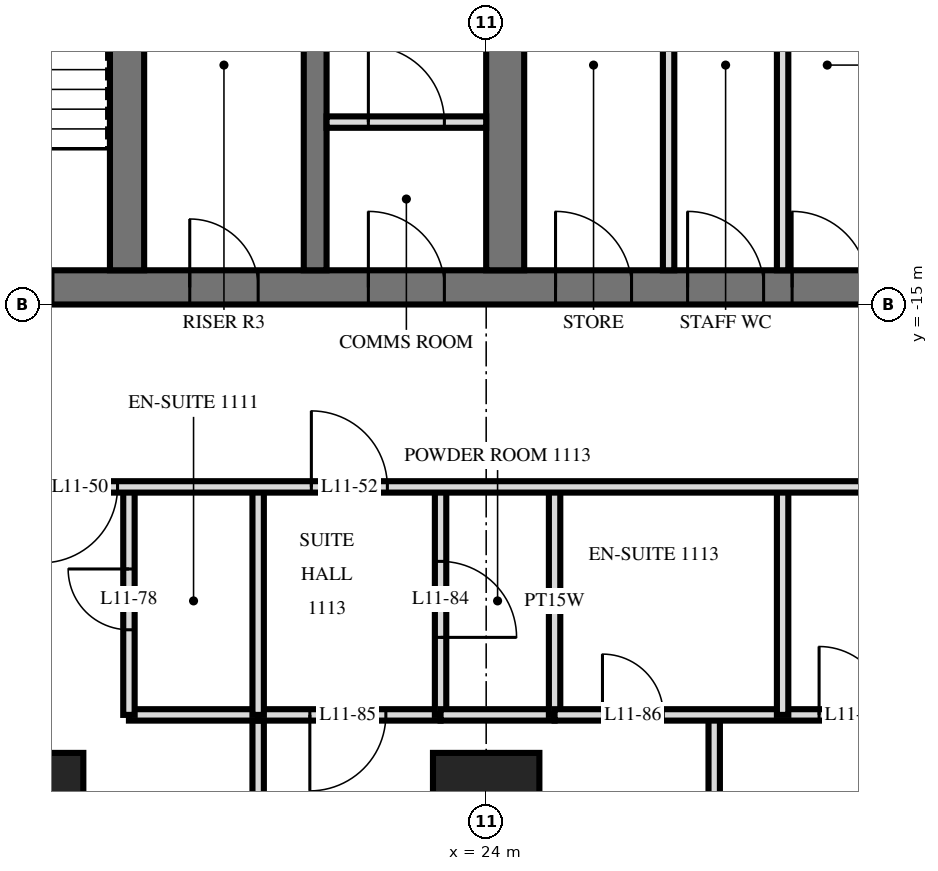
"""IFC4 building model, lengths in metres.
Left out: names, types, materials, properties, quantities, classifications, styles, units other than length and angle.
Written with IfcOpenShell. Run it as: python <this file> out.ifc"""

import sys

from ifc_helpers import new_model, si_unit, direction, frame, frame_2d, origin, origin_2d, place, context, subcontext, project, spatial, rectangle, extrude, element, fill, save


model = new_model("IFC4")
c1 = context("Model", 3, precision=1e-05, world=origin(), true_north=direction((0.0, 1.0)))
c2 = subcontext(c1, "Body", "Model", "MODEL_VIEW")
j1 = project(units=[si_unit("LENGTHUNIT", "METRE"), si_unit("PLANEANGLEUNIT", "RADIAN")], contexts=[c1])
p1 = place(None, origin())
s1 = spatial("IfcSite", under=j1, at=p1, CompositionType="ELEMENT")
p2 = place(p1, origin())
s2 = spatial("IfcBuilding", under=s1, at=p2, CompositionType="ELEMENT")
p3 = place(p2, frame((0.0, 0.0, 49.2)))
s3 = spatial("IfcBuildingStorey", under=s2, at=p3, CompositionType="ELEMENT", Elevation=49.2)
for number, where, z_axis, x_axis in (
    (1, (18.0, -21.6, 0.0), (0.0, 0.0, 1.0), (1.0, 0.0, 0.0)),
    (2, (24.0, -21.6, 0.0), (0.0, 0.0, 1.0), (1.0, 0.0, 0.0)),
):
    element("IfcColumn", number, at=place(p3, frame(where, z_axis=z_axis, x_axis=x_axis)), inside=s3, PredefinedType="COLUMN", context=c2, shape_type="SweptSolid", body=[
        extrude(rectangle(XDim=1.4, YDim=1.4, at=origin_2d()), origin(), (0.0, 0.0, 1.0), 3.6),
    ])
p4 = place(p3, frame((10.0, -14.775, 0.0), z_axis=(0.0, 0.0, 1.0), x_axis=(1.0, 0.0, 0.0)))
e3 = element("IfcWall", 3, at=p4, inside=s3, PredefinedType="SHEAR", context=c2, shape_type="SweptSolid", body=[
    extrude(rectangle(XDim=19.5, YDim=0.45, at=frame_2d((9.75, 0.0))), origin(), (0.0, 0.0, 1.0), 3.6),
])
p5 = place(p4, frame((7.1, 0.0, 0.0)))
e4 = element("IfcOpeningElement", 4, at=p5, cuts=e3, PredefinedType="OPENING", context=c2, shape_type="SweptSolid", body=[
    extrude(rectangle(XDim=1.2, YDim=2.1, at=frame_2d((0.6, 1.05))), frame((0.0, 0.235, 0.0), z_axis=(0.0, -1.0, 0.0), x_axis=(1.0, 0.0, 0.0)), (0.0, 0.0, 1.0), 0.47),
])
p6 = place(p4, frame((4.15, 0.0, 0.0)))
e5 = element("IfcOpeningElement", 5, at=p6, cuts=e3, PredefinedType="OPENING", context=c2, shape_type="SweptSolid", body=[
    extrude(rectangle(XDim=1.1, YDim=2.1, at=frame_2d((0.55, 1.05))), frame((0.0, 0.235, 0.0), z_axis=(0.0, -1.0, 0.0), x_axis=(1.0, 0.0, 0.0)), (0.0, 0.0, 1.0), 0.47),
])
p7 = place(p4, frame((10.1, 0.0, 0.0)))
e6 = element("IfcOpeningElement", 6, at=p7, cuts=e3, PredefinedType="OPENING", context=c2, shape_type="SweptSolid", body=[
    extrude(rectangle(XDim=0.9, YDim=2.1, at=frame_2d((0.45, 1.05))), frame((0.0, 0.235, 0.0), z_axis=(0.0, -1.0, 0.0), x_axis=(1.0, 0.0, 0.0)), (0.0, 0.0, 1.0), 0.47),
])
p8 = place(p4, frame((12.45, 0.0, 0.0)))
e7 = element("IfcOpeningElement", 7, at=p8, cuts=e3, PredefinedType="OPENING", context=c2, shape_type="SweptSolid", body=[
    extrude(rectangle(XDim=1.0, YDim=2.1, at=frame_2d((0.5, 1.05))), frame((0.0, 0.235, 0.0), z_axis=(0.0, -1.0, 0.0), x_axis=(1.0, 0.0, 0.0)), (0.0, 0.0, 1.0), 0.47),
])
p9 = place(p4, frame((14.913, 0.0, 0.0)))
e8 = element("IfcOpeningElement", 8, at=p9, cuts=e3, PredefinedType="OPENING", context=c2, shape_type="SweptSolid", body=[
    extrude(rectangle(XDim=1.0, YDim=2.1, at=frame_2d((0.5, 1.05))), frame((0.0, 0.235, 0.0), z_axis=(0.0, -1.0, 0.0), x_axis=(1.0, 0.0, 0.0)), (0.0, 0.0, 1.0), 0.47),
])
p10 = place(p4, frame((16.65, 0.0, 0.0)))
e9 = element("IfcOpeningElement", 9, at=p10, cuts=e3, PredefinedType="OPENING", context=c2, shape_type="SweptSolid", body=[
    extrude(rectangle(XDim=1.0, YDim=2.1, at=frame_2d((0.5, 1.05))), frame((0.0, 0.235, 0.0), z_axis=(0.0, -1.0, 0.0), x_axis=(1.0, 0.0, 0.0)), (0.0, 0.0, 1.0), 0.47),
])
p11 = place(p4, frame((18.025, 0.0, 0.0)))
e10 = element("IfcOpeningElement", 10, at=p11, cuts=e3, PredefinedType="OPENING", context=c2, shape_type="SweptSolid", body=[
    extrude(rectangle(XDim=1.0, YDim=2.1, at=frame_2d((0.5, 1.05))), frame((0.0, 0.235, 0.0), z_axis=(0.0, -1.0, 0.0), x_axis=(1.0, 0.0, 0.0)), (0.0, 0.0, 1.0), 0.47),
])
p12 = place(p3, frame((19.275, -14.55, 0.0), z_axis=(0.0, 0.0, 1.0), x_axis=(0.0, 1.0, 0.0)))
e11 = element("IfcWall", 11, at=p12, inside=s3, PredefinedType="SHEAR", context=c2, shape_type="SweptSolid", body=[
    extrude(rectangle(XDim=5.4, YDim=0.45, at=frame_2d((2.7, 0.0))), origin(), (0.0, 0.0, 1.0), 3.6),
])
p13 = place(p3, frame((21.75, -14.55, 0.0), z_axis=(0.0, 0.0, 1.0), x_axis=(0.0, 1.0, 0.0)))
e12 = element("IfcWall", 12, at=p13, inside=s3, PredefinedType="SHEAR", context=c2, shape_type="SweptSolid", body=[
    extrude(rectangle(XDim=5.4, YDim=0.3, at=frame_2d((2.7, 0.0))), origin(), (0.0, 0.0, 1.0), 3.6),
])
p14 = place(p3, frame((24.25, -14.55, 0.0), z_axis=(0.0, 0.0, 1.0), x_axis=(0.0, 1.0, 0.0)))
e13 = element("IfcWall", 13, at=p14, inside=s3, PredefinedType="SHEAR", context=c2, shape_type="SweptSolid", body=[
    extrude(rectangle(XDim=5.4, YDim=0.5, at=frame_2d((2.7, 0.0))), origin(), (0.0, 0.0, 1.0), 3.6),
])
p15 = place(p3, frame((21.9, -12.6, 0.0), z_axis=(0.0, 0.0, 1.0), x_axis=(1.0, 0.0, 0.0)))
e14 = element("IfcWall", 14, at=p15, inside=s3, PredefinedType="PARTITIONING", context=c2, shape_type="SweptSolid", body=[
    extrude(rectangle(XDim=2.1, YDim=0.15, at=frame_2d((1.05, 0.0))), origin(), (0.0, 0.0, 1.0), 3.3),
])
p16 = place(p15, frame((0.55, 0.0, 0.0)))
e15 = element("IfcOpeningElement", 15, at=p16, cuts=e14, PredefinedType="OPENING", context=c2, shape_type="SweptSolid", body=[
    extrude(rectangle(XDim=1.0, YDim=2.1, at=frame_2d((0.5, 1.05))), frame((0.0, 0.085, 0.0), z_axis=(0.0, -1.0, 0.0), x_axis=(1.0, 0.0, 0.0)), (0.0, 0.0, 1.0), 0.17),
])
for number, where, z_axis, x_axis in (
    (16, (26.4, -14.55, 0.0), (0.0, 0.0, 1.0), (0.0, 1.0, 0.0)),
    (17, (27.9, -14.55, 0.0), (0.0, 0.0, 1.0), (0.0, 1.0, 0.0)),
):
    element("IfcWall", number, at=place(p3, frame(where, z_axis=z_axis, x_axis=x_axis)), inside=s3, PredefinedType="PARTITIONING", context=c2, shape_type="SweptSolid", body=[
        extrude(rectangle(XDim=5.4, YDim=0.15, at=frame_2d((2.7, 0.0))), origin(), (0.0, 0.0, 1.0), 3.3),
    ])
p17 = place(p3, frame((27.9, -20.4, 0.0), z_axis=(0.0, 0.0, 1.0), x_axis=(0.0, 1.0, 0.0)))
e18 = element("IfcWall", 18, at=p17, inside=s3, PredefinedType="PARTITIONING", context=c2, shape_type="SweptSolid", body=[
    extrude(rectangle(XDim=3.0, YDim=0.15, at=frame_2d((1.5, 0.0))), origin(), (0.0, 0.0, 1.0), 3.32),
])
p18 = place(p3, frame((27.0, -29.22, 0.0), z_axis=(0.0, 0.0, 1.0), x_axis=(0.0, 1.0, 0.0)))
e19 = element("IfcWall", 19, at=p18, inside=s3, PredefinedType="PARTITIONING", context=c2, shape_type="SweptSolid", body=[
    extrude(rectangle(XDim=8.82, YDim=0.15, at=frame_2d((4.41, 0.0))), origin(), (0.0, 0.0, 1.0), 3.32),
])
p19 = place(p18, frame((3.87, 0.0, 0.0)))
e20 = element("IfcOpeningElement", 20, at=p19, cuts=e19, PredefinedType="OPENING", context=c2, shape_type="SweptSolid", body=[
    extrude(rectangle(XDim=0.9, YDim=2.1, at=frame_2d((0.45, 1.05))), frame((0.0, 0.085, 0.0), z_axis=(0.0, -1.0, 0.0), x_axis=(1.0, 0.0, 0.0)), (0.0, 0.0, 1.0), 0.17),
])
p20 = place(p3, frame((24.9, -20.4, 0.0), z_axis=(0.0, 0.0, 1.0), x_axis=(0.0, 1.0, 0.0)))
e21 = element("IfcWall", 21, at=p20, inside=s3, PredefinedType="PLUMBINGWALL", context=c2, shape_type="SweptSolid", body=[
    extrude(rectangle(XDim=3.0, YDim=0.15, at=frame_2d((1.5, 0.0))), origin(), (0.0, 0.0, 1.0), 3.32),
])
p21 = place(p3, frame((23.4, -20.4, 0.0), z_axis=(0.0, 0.0, 1.0), x_axis=(0.0, 1.0, 0.0)))
e22 = element("IfcWall", 22, at=p21, inside=s3, PredefinedType="PARTITIONING", context=c2, shape_type="SweptSolid", body=[
    extrude(rectangle(XDim=3.0, YDim=0.15, at=frame_2d((1.5, 0.0))), origin(), (0.0, 0.0, 1.0), 3.32),
])
p22 = place(p21, frame((1.02, 0.0, 0.0)))
e23 = element("IfcOpeningElement", 23, at=p22, cuts=e22, PredefinedType="OPENING", context=c2, shape_type="SweptSolid", body=[
    extrude(rectangle(XDim=1.0, YDim=2.1, at=frame_2d((0.5, 1.05))), frame((0.0, 0.085, 0.0), z_axis=(0.0, -1.0, 0.0), x_axis=(1.0, 0.0, 0.0)), (0.0, 0.0, 1.0), 0.17),
])
p23 = place(p3, frame((21.0, -20.4, 0.0), z_axis=(0.0, 0.0, 1.0), x_axis=(0.0, 1.0, 0.0)))
e24 = element("IfcWall", 24, at=p23, inside=s3, PredefinedType="PARTITIONING", context=c2, shape_type="SweptSolid", body=[
    extrude(rectangle(XDim=3.0, YDim=0.15, at=frame_2d((1.5, 0.0))), origin(), (0.0, 0.0, 1.0), 3.32),
])
p24 = place(p3, frame((21.0, -29.22, 0.0), z_axis=(0.0, 0.0, 1.0), x_axis=(0.0, 1.0, 0.0)))
e25 = element("IfcWall", 25, at=p24, inside=s3, PredefinedType="PARTITIONING", context=c2, shape_type="SweptSolid", body=[
    extrude(rectangle(XDim=8.82, YDim=0.15, at=frame_2d((4.41, 0.0))), origin(), (0.0, 0.0, 1.0), 3.32),
])
p25 = place(p3, frame((19.3, -20.4, 0.0), z_axis=(0.0, 0.0, 1.0), x_axis=(0.0, 1.0, 0.0)))
e26 = element("IfcWall", 26, at=p25, inside=s3, PredefinedType="PARTITIONING", context=c2, shape_type="SweptSolid", body=[
    extrude(rectangle(XDim=3.0, YDim=0.15, at=frame_2d((1.5, 0.0))), origin(), (0.0, 0.0, 1.0), 3.32),
])
p26 = place(p25, frame((1.12, 0.0, 0.0)))
e27 = element("IfcOpeningElement", 27, at=p26, cuts=e26, PredefinedType="OPENING", context=c2, shape_type="SweptSolid", body=[
    extrude(rectangle(XDim=0.8, YDim=2.1, at=frame_2d((0.4, 1.05))), frame((0.0, 0.085, 0.0), z_axis=(0.0, -1.0, 0.0), x_axis=(1.0, 0.0, 0.0)), (0.0, 0.0, 1.0), 0.17),
])
p27 = place(p3, frame((21.0, -20.4, 0.0), z_axis=(0.0, 0.0, 1.0), x_axis=(1.0, 0.0, 0.0)))
e28 = element("IfcWall", 28, at=p27, inside=s3, PredefinedType="PARTITIONING", context=c2, shape_type="SweptSolid", body=[
    extrude(rectangle(XDim=2.4, YDim=0.15, at=frame_2d((1.2, 0.0))), origin(), (0.0, 0.0, 1.0), 3.32),
])
p28 = place(p27, frame((0.68, 0.0, 0.0)))
e29 = element("IfcOpeningElement", 29, at=p28, cuts=e28, PredefinedType="OPENING", context=c2, shape_type="SweptSolid", body=[
    extrude(rectangle(XDim=1.0, YDim=2.1, at=frame_2d((0.5, 1.05))), frame((0.0, 0.085, 0.0), z_axis=(0.0, -1.0, 0.0), x_axis=(1.0, 0.0, 0.0)), (0.0, 0.0, 1.0), 0.17),
])
p29 = place(p3, frame((19.3, -20.4, 0.0), z_axis=(0.0, 0.0, 1.0), x_axis=(1.0, 0.0, 0.0)))
e30 = element("IfcWall", 30, at=p29, inside=s3, PredefinedType="PARTITIONING", context=c2, shape_type="SweptSolid", body=[
    extrude(rectangle(XDim=1.7, YDim=0.15, at=frame_2d((0.85, 0.0))), origin(), (0.0, 0.0, 1.0), 3.32),
])
p30 = place(p3, frame((24.9, -20.4, 0.0), z_axis=(0.0, 0.0, 1.0), x_axis=(1.0, 0.0, 0.0)))
e31 = element("IfcWall", 31, at=p30, inside=s3, PredefinedType="PARTITIONING", context=c2, shape_type="SweptSolid", body=[
    extrude(rectangle(XDim=8.22, YDim=0.15, at=frame_2d((4.11, 0.0))), origin(), (0.0, 0.0, 1.0), 3.32),
])
p31 = place(p30, frame((0.63, 0.0, 0.0)))
e32 = element("IfcOpeningElement", 32, at=p31, cuts=e31, PredefinedType="OPENING", context=c2, shape_type="SweptSolid", body=[
    extrude(rectangle(XDim=0.8, YDim=2.1, at=frame_2d((0.4, 1.05))), frame((0.0, 0.085, 0.0), z_axis=(0.0, -1.0, 0.0), x_axis=(1.0, 0.0, 0.0)), (0.0, 0.0, 1.0), 0.17),
])
p32 = place(p30, frame((3.48, 0.0, 0.0)))
e33 = element("IfcOpeningElement", 33, at=p32, cuts=e31, PredefinedType="OPENING", context=c2, shape_type="SweptSolid", body=[
    extrude(rectangle(XDim=0.9, YDim=2.1, at=frame_2d((0.45, 1.05))), frame((0.0, 0.085, 0.0), z_axis=(0.0, -1.0, 0.0), x_axis=(1.0, 0.0, 0.0)), (0.0, 0.0, 1.0), 0.17),
])
p33 = place(p3, frame((23.4, -20.4, 0.0), z_axis=(0.0, 0.0, 1.0), x_axis=(1.0, 0.0, 0.0)))
e34 = element("IfcWall", 34, at=p33, inside=s3, PredefinedType="PLUMBINGWALL", context=c2, shape_type="SweptSolid", body=[
    extrude(rectangle(XDim=1.5, YDim=0.15, at=frame_2d((0.75, 0.0))), origin(), (0.0, 0.0, 1.0), 3.32),
])
p34 = place(p3, frame((-33.12, -17.4, 0.0), z_axis=(0.0, 0.0, 1.0), x_axis=(1.0, 0.0, 0.0)))
e35 = element("IfcWall", 35, at=p34, inside=s3, PredefinedType="PARTITIONING", context=c2, shape_type="SweptSolid", body=[
    extrude(rectangle(XDim=66.24, YDim=0.15, at=frame_2d((33.12, 0.0))), origin(), (0.0, 0.0, 1.0), 3.32),
])
p35 = place(p34, frame((9.27, 0.0, 0.0)))
e36 = element("IfcOpeningElement", 36, at=p35, cuts=e35, PredefinedType="OPENING", context=c2, shape_type="SweptSolid", body=[
    extrude(rectangle(XDim=1.0, YDim=2.1, at=frame_2d((0.5, 1.05))), frame((0.0, 0.085, 0.0), z_axis=(0.0, -1.0, 0.0), x_axis=(1.0, 0.0, 0.0)), (0.0, 0.0, 1.0), 0.17),
])
p36 = place(p34, frame((13.97, 0.0, 0.0)))
e37 = element("IfcOpeningElement", 37, at=p36, cuts=e35, PredefinedType="OPENING", context=c2, shape_type="SweptSolid", body=[
    extrude(rectangle(XDim=1.0, YDim=2.1, at=frame_2d((0.5, 1.05))), frame((0.0, 0.085, 0.0), z_axis=(0.0, -1.0, 0.0), x_axis=(1.0, 0.0, 0.0)), (0.0, 0.0, 1.0), 0.17),
])
p37 = place(p34, frame((15.27, 0.0, 0.0)))
e38 = element("IfcOpeningElement", 38, at=p37, cuts=e35, PredefinedType="OPENING", context=c2, shape_type="SweptSolid", body=[
    extrude(rectangle(XDim=1.0, YDim=2.1, at=frame_2d((0.5, 1.05))), frame((0.0, 0.085, 0.0), z_axis=(0.0, -1.0, 0.0), x_axis=(1.0, 0.0, 0.0)), (0.0, 0.0, 1.0), 0.17),
])
p38 = place(p34, frame((19.97, 0.0, 0.0)))
e39 = element("IfcOpeningElement", 39, at=p38, cuts=e35, PredefinedType="OPENING", context=c2, shape_type="SweptSolid", body=[
    extrude(rectangle(XDim=1.0, YDim=2.1, at=frame_2d((0.5, 1.05))), frame((0.0, 0.085, 0.0), z_axis=(0.0, -1.0, 0.0), x_axis=(1.0, 0.0, 0.0)), (0.0, 0.0, 1.0), 0.17),
])
p39 = place(p34, frame((22.27, 0.0, 0.0)))
e40 = element("IfcOpeningElement", 40, at=p39, cuts=e35, PredefinedType="OPENING", context=c2, shape_type="SweptSolid", body=[
    extrude(rectangle(XDim=1.0, YDim=2.1, at=frame_2d((0.5, 1.05))), frame((0.0, 0.085, 0.0), z_axis=(0.0, -1.0, 0.0), x_axis=(1.0, 0.0, 0.0)), (0.0, 0.0, 1.0), 0.17),
])
p40 = place(p34, frame((28.97, 0.0, 0.0)))
e41 = element("IfcOpeningElement", 41, at=p40, cuts=e35, PredefinedType="OPENING", context=c2, shape_type="SweptSolid", body=[
    extrude(rectangle(XDim=1.0, YDim=2.1, at=frame_2d((0.5, 1.05))), frame((0.0, 0.085, 0.0), z_axis=(0.0, -1.0, 0.0), x_axis=(1.0, 0.0, 0.0)), (0.0, 0.0, 1.0), 0.17),
])
p41 = place(p34, frame((30.27, 0.0, 0.0)))
e42 = element("IfcOpeningElement", 42, at=p41, cuts=e35, PredefinedType="OPENING", context=c2, shape_type="SweptSolid", body=[
    extrude(rectangle(XDim=1.0, YDim=2.1, at=frame_2d((0.5, 1.05))), frame((0.0, 0.085, 0.0), z_axis=(0.0, -1.0, 0.0), x_axis=(1.0, 0.0, 0.0)), (0.0, 0.0, 1.0), 0.17),
])
p42 = place(p34, frame((34.97, 0.0, 0.0)))
e43 = element("IfcOpeningElement", 43, at=p42, cuts=e35, PredefinedType="OPENING", context=c2, shape_type="SweptSolid", body=[
    extrude(rectangle(XDim=1.0, YDim=2.1, at=frame_2d((0.5, 1.05))), frame((0.0, 0.085, 0.0), z_axis=(0.0, -1.0, 0.0), x_axis=(1.0, 0.0, 0.0)), (0.0, 0.0, 1.0), 0.17),
])
p43 = place(p34, frame((36.27, 0.0, 0.0)))
e44 = element("IfcOpeningElement", 44, at=p43, cuts=e35, PredefinedType="OPENING", context=c2, shape_type="SweptSolid", body=[
    extrude(rectangle(XDim=1.0, YDim=2.1, at=frame_2d((0.5, 1.05))), frame((0.0, 0.085, 0.0), z_axis=(0.0, -1.0, 0.0), x_axis=(1.0, 0.0, 0.0)), (0.0, 0.0, 1.0), 0.17),
])
p44 = place(p34, frame((39.82, 0.0, 0.0)))
e45 = element("IfcOpeningElement", 45, at=p44, cuts=e35, PredefinedType="OPENING", context=c2, shape_type="SweptSolid", body=[
    extrude(rectangle(XDim=1.0, YDim=2.1, at=frame_2d((0.5, 1.05))), frame((0.0, 0.085, 0.0), z_axis=(0.0, -1.0, 0.0), x_axis=(1.0, 0.0, 0.0)), (0.0, 0.0, 1.0), 0.17),
])
p45 = place(p34, frame((51.27, 0.0, 0.0)))
e46 = element("IfcOpeningElement", 46, at=p45, cuts=e35, PredefinedType="OPENING", context=c2, shape_type="SweptSolid", body=[
    extrude(rectangle(XDim=1.0, YDim=2.1, at=frame_2d((0.5, 1.05))), frame((0.0, 0.085, 0.0), z_axis=(0.0, -1.0, 0.0), x_axis=(1.0, 0.0, 0.0)), (0.0, 0.0, 1.0), 0.17),
])
p46 = place(p34, frame((4.42, 0.0, 0.0)))
e47 = element("IfcOpeningElement", 47, at=p46, cuts=e35, PredefinedType="OPENING", context=c2, shape_type="SweptSolid", body=[
    extrude(rectangle(XDim=1.0, YDim=2.1, at=frame_2d((0.5, 1.05))), frame((0.0, 0.085, 0.0), z_axis=(0.0, -1.0, 0.0), x_axis=(1.0, 0.0, 0.0)), (0.0, 0.0, 1.0), 0.17),
])
p47 = place(p34, frame((54.82, 0.0, 0.0)))
e48 = element("IfcOpeningElement", 48, at=p47, cuts=e35, PredefinedType="OPENING", context=c2, shape_type="SweptSolid", body=[
    extrude(rectangle(XDim=1.0, YDim=2.1, at=frame_2d((0.5, 1.05))), frame((0.0, 0.085, 0.0), z_axis=(0.0, -1.0, 0.0), x_axis=(1.0, 0.0, 0.0)), (0.0, 0.0, 1.0), 0.17),
])
p48 = place(p5, origin())
e49 = element("IfcDoor", 49, at=p48, inside=s3, OperationType="SINGLE_SWING_RIGHT", PredefinedType="DOOR", context=c2, shape_type="SweptSolid", body=[
    extrude(rectangle(XDim=1.2, YDim=2.1, at=frame_2d((0.6, 1.05))), frame((0.0, 0.025, 0.0), z_axis=(0.0, -1.0, 0.0), x_axis=(1.0, 0.0, 0.0)), (0.0, 0.0, 1.0), 0.05),
])
fill(e4, e49)
p49 = place(p7, origin())
e50 = element("IfcDoor", 50, at=p49, inside=s3, OperationType="SINGLE_SWING_RIGHT", PredefinedType="DOOR", context=c2, shape_type="SweptSolid", body=[
    extrude(rectangle(XDim=0.9, YDim=2.1, at=frame_2d((0.45, 1.05))), frame((0.0, 0.025, 0.0), z_axis=(0.0, -1.0, 0.0), x_axis=(1.0, 0.0, 0.0)), (0.0, 0.0, 1.0), 0.05),
])
fill(e6, e50)
p50 = place(p8, origin())
e51 = element("IfcDoor", 51, at=p50, inside=s3, OperationType="SINGLE_SWING_RIGHT", PredefinedType="DOOR", context=c2, shape_type="SweptSolid", body=[
    extrude(rectangle(XDim=1.0, YDim=2.1, at=frame_2d((0.5, 1.05))), frame((0.0, 0.025, 0.0), z_axis=(0.0, -1.0, 0.0), x_axis=(1.0, 0.0, 0.0)), (0.0, 0.0, 1.0), 0.05),
])
fill(e7, e51)
p51 = place(p9, origin())
e52 = element("IfcDoor", 52, at=p51, inside=s3, OperationType="SINGLE_SWING_RIGHT", PredefinedType="DOOR", context=c2, shape_type="SweptSolid", body=[
    extrude(rectangle(XDim=1.0, YDim=2.1, at=frame_2d((0.5, 1.05))), frame((0.0, 0.025, 0.0), z_axis=(0.0, -1.0, 0.0), x_axis=(1.0, 0.0, 0.0)), (0.0, 0.0, 1.0), 0.05),
])
fill(e8, e52)
p52 = place(p10, origin())
e53 = element("IfcDoor", 53, at=p52, inside=s3, OperationType="SINGLE_SWING_RIGHT", PredefinedType="DOOR", context=c2, shape_type="SweptSolid", body=[
    extrude(rectangle(XDim=1.0, YDim=2.1, at=frame_2d((0.5, 1.05))), frame((0.0, 0.025, 0.0), z_axis=(0.0, -1.0, 0.0), x_axis=(1.0, 0.0, 0.0)), (0.0, 0.0, 1.0), 0.05),
])
fill(e9, e53)
p53 = place(p11, origin())
e54 = element("IfcDoor", 54, at=p53, inside=s3, OperationType="SINGLE_SWING_RIGHT", PredefinedType="DOOR", context=c2, shape_type="SweptSolid", body=[
    extrude(rectangle(XDim=1.0, YDim=2.1, at=frame_2d((0.5, 1.05))), frame((0.0, 0.025, 0.0), z_axis=(0.0, -1.0, 0.0), x_axis=(1.0, 0.0, 0.0)), (0.0, 0.0, 1.0), 0.05),
])
fill(e10, e54)
p54 = place(p16, origin())
e55 = element("IfcDoor", 55, at=p54, inside=s3, OperationType="SINGLE_SWING_RIGHT", PredefinedType="DOOR", context=c2, shape_type="SweptSolid", body=[
    extrude(rectangle(XDim=1.0, YDim=2.1, at=frame_2d((0.5, 1.05))), frame((0.0, 0.025, 0.0), z_axis=(0.0, -1.0, 0.0), x_axis=(1.0, 0.0, 0.0)), (0.0, 0.0, 1.0), 0.05),
])
fill(e15, e55)
p55 = place(p45, frame((0.5, 0.0, 0.0), z_axis=(0.0, 0.0, 1.0), x_axis=(-1.0, 0.0, 0.0)))
e56 = element("IfcDoor", 56, at=p55, inside=s3, OperationType="SINGLE_SWING_LEFT", PredefinedType="DOOR", context=c2, shape_type="SweptSolid", body=[
    extrude(rectangle(XDim=1.0, YDim=2.1, at=frame_2d((0.0, 1.05))), frame((0.0, -0.025, 0.0), z_axis=(0.0, 1.0, 0.0), x_axis=(-1.0, 0.0, 0.0)), (0.0, 0.0, 1.0), 0.05),
])
fill(e46, e56)
p56 = place(p47, origin())
e57 = element("IfcDoor", 57, at=p56, inside=s3, OperationType="SINGLE_SWING_RIGHT", PredefinedType="DOOR", context=c2, shape_type="SweptSolid", body=[
    extrude(rectangle(XDim=1.0, YDim=2.1, at=frame_2d((0.5, 1.05))), frame((0.0, 0.025, 0.0), z_axis=(0.0, -1.0, 0.0), x_axis=(1.0, 0.0, 0.0)), (0.0, 0.0, 1.0), 0.05),
])
fill(e48, e57)
p57 = place(p26, origin())
e58 = element("IfcDoor", 58, at=p57, inside=s3, OperationType="SINGLE_SWING_LEFT", PredefinedType="DOOR", context=c2, shape_type="SweptSolid", body=[
    extrude(rectangle(XDim=0.8, YDim=2.1, at=frame_2d((0.4, 1.05))), frame((0.0, 0.025, 0.0), z_axis=(0.0, -1.0, 0.0), x_axis=(1.0, 0.0, 0.0)), (0.0, 0.0, 1.0), 0.05),
])
fill(e27, e58)
p58 = place(p22, frame((0.5, 0.0, 0.0), z_axis=(0.0, 0.0, 1.0), x_axis=(-1.0, 0.0, 0.0)))
e59 = element("IfcDoor", 59, at=p58, inside=s3, OperationType="SINGLE_SWING_LEFT", PredefinedType="DOOR", context=c2, shape_type="SweptSolid", body=[
    extrude(rectangle(XDim=1.0, YDim=2.1, at=frame_2d((0.0, 1.05))), frame((0.0, -0.025, 0.0), z_axis=(0.0, 1.0, 0.0), x_axis=(-1.0, 0.0, 0.0)), (0.0, 0.0, 1.0), 0.05),
])
fill(e23, e59)
p59 = place(p28, frame((0.5, 0.0, 0.0), z_axis=(0.0, 0.0, 1.0), x_axis=(-1.0, 0.0, 0.0)))
e60 = element("IfcDoor", 60, at=p59, inside=s3, OperationType="SINGLE_SWING_LEFT", PredefinedType="DOOR", context=c2, shape_type="SweptSolid", body=[
    extrude(rectangle(XDim=1.0, YDim=2.1, at=frame_2d((0.0, 1.05))), frame((0.0, -0.025, 0.0), z_axis=(0.0, 1.0, 0.0), x_axis=(-1.0, 0.0, 0.0)), (0.0, 0.0, 1.0), 0.05),
])
fill(e29, e60)
p60 = place(p31, origin())
e61 = element("IfcDoor", 61, at=p60, inside=s3, OperationType="SINGLE_SWING_RIGHT", PredefinedType="DOOR", context=c2, shape_type="SweptSolid", body=[
    extrude(rectangle(XDim=0.8, YDim=2.1, at=frame_2d((0.4, 1.05))), frame((0.0, 0.025, 0.0), z_axis=(0.0, -1.0, 0.0), x_axis=(1.0, 0.0, 0.0)), (0.0, 0.0, 1.0), 0.05),
])
fill(e32, e61)
p61 = place(p32, origin())
e62 = element("IfcDoor", 62, at=p61, inside=s3, OperationType="SINGLE_SWING_RIGHT", PredefinedType="DOOR", context=c2, shape_type="SweptSolid", body=[
    extrude(rectangle(XDim=0.9, YDim=2.1, at=frame_2d((0.45, 1.05))), frame((0.0, 0.025, 0.0), z_axis=(0.0, -1.0, 0.0), x_axis=(1.0, 0.0, 0.0)), (0.0, 0.0, 1.0), 0.05),
])
fill(e33, e62)
save(model, sys.argv[1])
